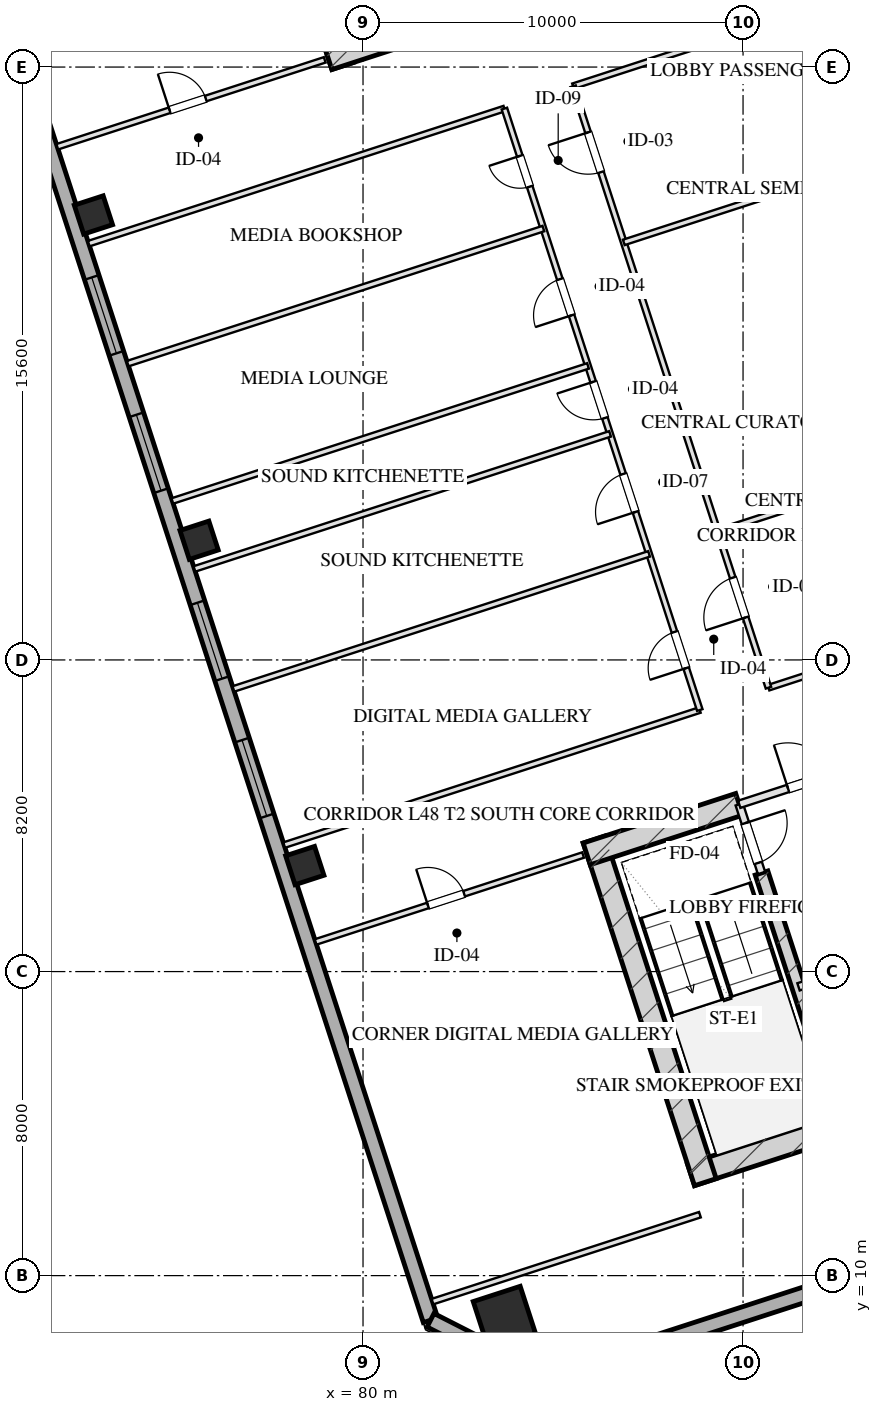
"""IFC4 building model, lengths in metres.
Left out: names, types, materials, properties, quantities, classifications, styles, units other than length and angle.
Written with IfcOpenShell. Run it as: python <this file> out.ifc"""

import sys

from ifc_helpers import new_model, si_unit, direction, frame, frame_2d, origin, origin_2d, place, context, subcontext, project, spatial, rectangle, hollow_rectangle, extrude, element, fill, save


model = new_model("IFC4")
c1 = context("Model", 3, precision=1e-05, world=origin(), true_north=direction((0.0, 1.0)))
c2 = subcontext(c1, "Body", "Model", "MODEL_VIEW")
j1 = project(units=[si_unit("LENGTHUNIT", "METRE"), si_unit("PLANEANGLEUNIT", "RADIAN")], contexts=[c1])
p1 = place(None, origin())
s1 = spatial("IfcSite", under=j1, at=p1, CompositionType="ELEMENT")
p2 = place(p1, origin())
s2 = spatial("IfcBuilding", under=s1, at=p2, CompositionType="ELEMENT")
p3 = place(p2, frame((0.0, 0.0, 180.55)))
s3 = spatial("IfcBuildingStorey", under=s2, at=p3, CompositionType="ELEMENT", Elevation=180.55)
p4 = place(p3, frame((88.63, 12.652, 0.0), z_axis=(0.0, 0.0, 1.0), x_axis=(0.95105714907, 0.309015046886, 0.0)))
e1 = element("IfcWall", 1, at=p4, inside=s3, PredefinedType="SHEAR", context=c2, shape_type="SweptSolid", body=[
    extrude(rectangle(XDim=16.4, YDim=0.6, at=frame_2d((8.2, 0.0))), origin(), (0.0, 0.0, 1.0), 3.45),
])
p5 = place(p3, frame((86.078, 21.475, 0.0), z_axis=(0.0, 0.0, 1.0), x_axis=(0.309017938678, -0.951056209472, 0.0)))
e2 = element("IfcWall", 2, at=p5, inside=s3, PredefinedType="SHEAR", context=c2, shape_type="SweptSolid", body=[
    extrude(rectangle(XDim=9.48, YDim=0.6, at=frame_2d((4.74, 0.0))), origin(), (0.0, 0.0, 1.0), 3.45),
])
p6 = place(p3, frame((90.486, 20.594, 0.0), z_axis=(0.0, 0.0, 1.0), x_axis=(0.309020428229, -0.951055400562, 0.0)))
e3 = element("IfcWall", 3, at=p6, inside=s3, PredefinedType="SHEAR", context=c2, shape_type="SweptSolid", body=[
    extrude(rectangle(XDim=6.98, YDim=0.35, at=frame_2d((3.49, 0.0))), origin(), (0.0, 0.0, 1.0), 3.45),
])
p7 = place(p3, frame((85.886, 21.097, 0.0), z_axis=(0.0, 0.0, 1.0), x_axis=(0.951068073652, 0.308981422225, 0.0)))
e4 = element("IfcWall", 4, at=p7, inside=s3, PredefinedType="SHEAR", context=c2, shape_type="SweptSolid", body=[
    extrude(rectangle(XDim=4.22, YDim=0.6, at=frame_2d((2.11, 0.0))), origin(), (0.0, 0.0, 1.0), 3.45),
])
p8 = place(p3, frame((79.466, 41.828, 0.0), z_axis=(0.0, 0.0, 1.0), x_axis=(-0.309041232772, 0.951048640421, 0.0)))
e5 = element("IfcWall", 5, at=p8, inside=s3, PredefinedType="SHEAR", context=c2, shape_type="SweptSolid", body=[
    extrude(rectangle(XDim=9.48, YDim=0.6, at=frame_2d((4.74, 0.0))), origin(), (0.0, 0.0, 1.0), 3.45),
])
p9 = place(p3, frame((79.087, 42.021, 0.0), z_axis=(0.0, 0.0, 1.0), x_axis=(0.951062550203, 0.3089984233, 0.0)))
e6 = element("IfcWall", 6, at=p9, inside=s3, PredefinedType="SHEAR", context=c2, shape_type="SweptSolid", body=[
    extrude(rectangle(XDim=4.22, YDim=0.6, at=frame_2d((2.11, 0.0))), origin(), (0.0, 0.0, 1.0), 3.45),
])
p10 = place(p3, frame((83.719, 8.901, 0.0), z_axis=(0.0, 0.0, 1.0), x_axis=(0.951056516295, 0.309016994375, 0.0)))
e7 = element("IfcColumn", 7, at=p10, inside=s3, PredefinedType="COLUMN", context=c2, shape_type="SweptSolid", body=[
    extrude(hollow_rectangle(XDim=1.3, YDim=1.3, WallThickness=0.045, at=origin_2d()), origin(), (0.0, 0.0, 1.0), 3.451),
])
for number, where, z_axis, x_axis in (
    (8, (78.468, 20.79, 0.0), (0.0, 0.0, 1.0), (0.951, 0.309, 0.0)),
    (9, (75.687, 29.349, 0.0), (0.0, 0.0, 1.0), (0.951, 0.309, 0.0)),
    (10, (72.906, 37.909, 0.0), (0.0, 0.0, 1.0), (0.951, 0.309, 0.0)),
):
    element("IfcColumn", number, at=place(p3, frame(where, z_axis=z_axis, x_axis=x_axis)), inside=s3, PredefinedType="COLUMN", context=c2, shape_type="SweptSolid", body=[
        extrude(hollow_rectangle(XDim=0.8, YDim=0.8, WallThickness=0.028, at=origin_2d()), origin(), (0.0, 0.0, 1.0), 3.451),
    ])
p11 = place(p3, frame((81.776, 8.827, 0.0), z_axis=(0.0, 0.0, 1.0), x_axis=(-0.309014228706, 0.951057414911, 0.0)))
e11 = element("IfcWall", 11, at=p11, inside=s3, PredefinedType="SOLIDWALL", context=c2, shape_type="SweptSolid", body=[
    extrude(rectangle(XDim=42.8, YDim=0.4, at=frame_2d((21.4, 0.0))), origin(), (0.0, 0.0, 1.0), 2.55),
])
p12 = place(p11, frame((13.95, 0.0, 0.75)))
e12 = element("IfcOpeningElement", 12, at=p12, cuts=e11, PredefinedType="OPENING", context=c2, shape_type="SweptSolid", body=[
    extrude(rectangle(XDim=2.1, YDim=1.4, at=frame_2d((1.05, 0.7))), frame((0.0, 0.21, 0.0), z_axis=(0.0, -1.0, 0.0), x_axis=(1.0, 0.0, 0.0)), (0.0, 0.0, 1.0), 0.42),
])
p13 = place(p11, frame((17.75, 0.0, 0.75)))
e13 = element("IfcOpeningElement", 13, at=p13, cuts=e11, PredefinedType="OPENING", context=c2, shape_type="SweptSolid", body=[
    extrude(rectangle(XDim=2.1, YDim=1.4, at=frame_2d((1.05, 0.7))), frame((0.0, 0.21, 0.0), z_axis=(0.0, -1.0, 0.0), x_axis=(1.0, 0.0, 0.0)), (0.0, 0.0, 1.0), 0.42),
])
p14 = place(p11, frame((22.95, 0.0, 0.75)))
e14 = element("IfcOpeningElement", 14, at=p14, cuts=e11, PredefinedType="OPENING", context=c2, shape_type="SweptSolid", body=[
    extrude(rectangle(XDim=2.1, YDim=1.4, at=frame_2d((1.05, 0.7))), frame((0.0, 0.21, 0.0), z_axis=(0.0, -1.0, 0.0), x_axis=(1.0, 0.0, 0.0)), (0.0, 0.0, 1.0), 0.42),
])
p15 = place(p11, frame((26.75, 0.0, 0.75)))
e15 = element("IfcOpeningElement", 15, at=p15, cuts=e11, PredefinedType="OPENING", context=c2, shape_type="SweptSolid", body=[
    extrude(rectangle(XDim=2.1, YDim=1.4, at=frame_2d((1.05, 0.7))), frame((0.0, 0.21, 0.0), z_axis=(0.0, -1.0, 0.0), x_axis=(1.0, 0.0, 0.0)), (0.0, 0.0, 1.0), 0.42),
])
p16 = place(p3, frame((109.908, 15.444, 0.0), z_axis=(0.0, 0.0, 1.0), x_axis=(-0.951057580055, -0.30901372044, 0.0)))
e16 = element("IfcWall", 16, at=p16, inside=s3, PredefinedType="SOLIDWALL", context=c2, shape_type="SweptSolid", body=[
    extrude(rectangle(XDim=26.4, YDim=0.4, at=frame_2d((13.2, 0.0))), origin(), (0.0, 0.0, 1.0), 2.55),
])
p17 = place(p3, frame((84.801, 7.286, 0.0), z_axis=(0.0, 0.0, 1.0), x_axis=(-0.891020832027, 0.453962417932, 0.0)))
e17 = element("IfcWall", 17, at=p17, inside=s3, PredefinedType="SOLIDWALL", context=c2, shape_type="SweptSolid", body=[
    extrude(rectangle(XDim=3.394, YDim=0.4, at=frame_2d((1.697, 0.0))), origin(), (0.0, 0.0, 1.0), 2.55),
])
p18 = place(p3, frame((89.899, 22.401, 0.0), z_axis=(0.0, 0.0, 1.0), x_axis=(0.308932062672, -0.951084108086, 0.0)))
e18 = element("IfcWall", 18, at=p18, inside=s3, PredefinedType="PARTITIONING", context=c2, shape_type="SweptSolid", body=[
    extrude(rectangle(XDim=1.9, YDim=0.2, at=frame_2d((0.95, 0.0))), origin(), (0.0, 0.0, 1.0), 3.155),
])
p19 = place(p18, frame((0.52, 0.0, 0.0)))
e19 = element("IfcOpeningElement", 19, at=p19, cuts=e18, PredefinedType="OPENING", context=c2, shape_type="SweptSolid", body=[
    extrude(rectangle(XDim=1.1, YDim=2.05, at=frame_2d((0.55, 1.025))), frame((0.0, 0.11, 0.0), z_axis=(0.0, -1.0, 0.0), x_axis=(1.0, 0.0, 0.0)), (0.0, 0.0, 1.0), 0.22),
])
p20 = place(p3, frame((89.899, 22.401, 0.0), z_axis=(0.0, 0.0, 1.0), x_axis=(0.951046716504, 0.309047153403, 0.0)))
e20 = element("IfcWall", 20, at=p20, inside=s3, PredefinedType="PARTITIONING", context=c2, shape_type="SweptSolid", body=[
    extrude(rectangle(XDim=3.83, YDim=0.2, at=frame_2d((1.915, 0.0))), origin(), (0.0, 0.0, 1.0), 3.155),
])
p21 = place(p20, frame((1.35, 0.0, 0.0)))
e21 = element("IfcOpeningElement", 21, at=p21, cuts=e20, PredefinedType="OPENING", context=c2, shape_type="SweptSolid", body=[
    extrude(rectangle(XDim=1.2, YDim=2.05, at=frame_2d((0.6, 1.025))), frame((0.0, 0.11, 0.0), z_axis=(0.0, -1.0, 0.0), x_axis=(1.0, 0.0, 0.0)), (0.0, 0.0, 1.0), 0.22),
])
p22 = place(p3, frame((91.46, 17.598, 0.0), z_axis=(0.0, 0.0, 1.0), x_axis=(0.951062257173, 0.308999325213, 0.0)))
e22 = element("IfcWall", 22, at=p22, inside=s3, PredefinedType="PARTITIONING", context=c2, shape_type="SweptSolid", body=[
    extrude(rectangle(XDim=2.1, YDim=0.2, at=frame_2d((1.05, 0.0))), origin(), (0.0, 0.0, 1.0), 3.155),
])
p23 = place(p22, frame((0.35, 0.0, 0.0)))
e23 = element("IfcOpeningElement", 23, at=p23, cuts=e22, PredefinedType="OPENING", context=c2, shape_type="SweptSolid", body=[
    extrude(rectangle(XDim=1.1, YDim=2.05, at=frame_2d((0.55, 1.025))), frame((0.0, 0.11, 0.0), z_axis=(0.0, -1.0, 0.0), x_axis=(1.0, 0.0, 0.0)), (0.0, 0.0, 1.0), 0.22),
])
p24 = place(p3, frame((81.828, 9.316, 0.0), z_axis=(0.0, 0.0, 1.0), x_axis=(0.95105128112, 0.309033106124, 0.0)))
e24 = element("IfcWall", 24, at=p24, inside=s3, PredefinedType="PARTITIONING", context=c2, shape_type="SweptSolid", body=[
    extrude(rectangle(XDim=7.4, YDim=0.15, at=frame_2d((3.7, 0.0))), origin(), (0.0, 0.0, 1.0), 3.155),
])
p25 = place(p3, frame((78.753, 18.78, 0.0), z_axis=(0.0, 0.0, 1.0), x_axis=(0.951060977215, 0.309003264738, 0.0)))
e25 = element("IfcWall", 25, at=p25, inside=s3, PredefinedType="PARTITIONING", context=c2, shape_type="SweptSolid", body=[
    extrude(rectangle(XDim=7.4, YDim=0.15, at=frame_2d((3.7, 0.0))), origin(), (0.0, 0.0, 1.0), 3.155),
])
p26 = place(p25, frame((3.108, 0.0, 0.0)))
e26 = element("IfcOpeningElement", 26, at=p26, cuts=e25, PredefinedType="OPENING", context=c2, shape_type="SweptSolid", body=[
    extrude(rectangle(XDim=1.0, YDim=2.05, at=frame_2d((0.5, 1.025))), frame((0.0, 0.085, 0.0), z_axis=(0.0, -1.0, 0.0), x_axis=(1.0, 0.0, 0.0)), (0.0, 0.0, 1.0), 0.17),
])
p27 = place(p3, frame((71.955, 39.703, 0.0), z_axis=(0.0, 0.0, 1.0), x_axis=(0.951060977215, 0.309003264738, 0.0)))
e27 = element("IfcWall", 27, at=p27, inside=s3, PredefinedType="PARTITIONING", context=c2, shape_type="SweptSolid", body=[
    extrude(rectangle(XDim=7.4, YDim=0.15, at=frame_2d((3.7, 0.0))), origin(), (0.0, 0.0, 1.0), 3.155),
])
p28 = place(p27, frame((3.108, 0.0, 0.0)))
e28 = element("IfcOpeningElement", 28, at=p28, cuts=e27, PredefinedType="OPENING", context=c2, shape_type="SweptSolid", body=[
    extrude(rectangle(XDim=1.0, YDim=2.05, at=frame_2d((0.5, 1.025))), frame((0.0, 0.085, 0.0), z_axis=(0.0, -1.0, 0.0), x_axis=(1.0, 0.0, 0.0)), (0.0, 0.0, 1.0), 0.17),
])
p29 = place(p3, frame((77.925, 21.328, 0.0), z_axis=(0.0, 0.0, 1.0), x_axis=(0.951054972381, 0.309021746015, 0.0)))
e29 = element("IfcWall", 29, at=p29, inside=s3, PredefinedType="PARTITIONING", context=c2, shape_type="SweptSolid", body=[
    extrude(rectangle(XDim=11.5, YDim=0.15, at=frame_2d((5.75, 0.0))), origin(), (0.0, 0.0, 1.0), 3.155),
])
p30 = place(p3, frame((90.669, 25.469, 0.0), z_axis=(0.0, 0.0, 1.0), x_axis=(0.95106136293, 0.309002077568, 0.0)))
e30 = element("IfcWall", 30, at=p30, inside=s3, PredefinedType="PARTITIONING", context=c2, shape_type="SweptSolid", body=[
    extrude(rectangle(XDim=8.15, YDim=0.15, at=frame_2d((4.075, 0.0))), origin(), (0.0, 0.0, 1.0), 3.155),
])
p31 = place(p3, frame((72.783, 37.154, 0.0), z_axis=(0.0, 0.0, 1.0), x_axis=(0.951056999652, 0.309015506751, 0.0)))
e31 = element("IfcWall", 31, at=p31, inside=s3, PredefinedType="PARTITIONING", context=c2, shape_type="SweptSolid", body=[
    extrude(rectangle(XDim=11.5, YDim=0.15, at=frame_2d((5.75, 0.0))), origin(), (0.0, 0.0, 1.0), 3.155),
])
p32 = place(p3, frame((85.527, 41.295, 0.0), z_axis=(0.0, 0.0, 1.0), x_axis=(0.951055419664, 0.309020369437, 0.0)))
e32 = element("IfcWall", 32, at=p32, inside=s3, PredefinedType="PARTITIONING", context=c2, shape_type="SweptSolid", body=[
    extrude(rectangle(XDim=8.15, YDim=0.15, at=frame_2d((4.075, 0.0))), origin(), (0.0, 0.0, 1.0), 3.155),
])
p33 = place(p3, frame((88.862, 24.882, 0.0), z_axis=(0.0, 0.0, 1.0), x_axis=(-0.309008771245, 0.951059188113, 0.0)))
e33 = element("IfcWall", 33, at=p33, inside=s3, PredefinedType="PARTITIONING", context=c2, shape_type="SweptSolid", body=[
    extrude(rectangle(XDim=16.64, YDim=0.15, at=frame_2d((8.32, 0.0))), origin(), (0.0, 0.0, 1.0), 3.155),
])
p34 = place(p33, frame((1.16, 0.0, 0.0)))
e34 = element("IfcOpeningElement", 34, at=p34, cuts=e33, PredefinedType="OPENING", context=c2, shape_type="SweptSolid", body=[
    extrude(rectangle(XDim=1.0, YDim=2.05, at=frame_2d((0.5, 1.025))), frame((0.0, 0.085, 0.0), z_axis=(0.0, -1.0, 0.0), x_axis=(1.0, 0.0, 0.0)), (0.0, 0.0, 1.0), 0.17),
])
p35 = place(p33, frame((5.48, 0.0, 0.0)))
e35 = element("IfcOpeningElement", 35, at=p35, cuts=e33, PredefinedType="OPENING", context=c2, shape_type="SweptSolid", body=[
    extrude(rectangle(XDim=1.05, YDim=2.05, at=frame_2d((0.525, 1.025))), frame((0.0, 0.085, 0.0), z_axis=(0.0, -1.0, 0.0), x_axis=(1.0, 0.0, 0.0)), (0.0, 0.0, 1.0), 0.17),
])
p36 = place(p33, frame((8.08, 0.0, 0.0)))
e36 = element("IfcOpeningElement", 36, at=p36, cuts=e33, PredefinedType="OPENING", context=c2, shape_type="SweptSolid", body=[
    extrude(rectangle(XDim=1.0, YDim=2.05, at=frame_2d((0.5, 1.025))), frame((0.0, 0.085, 0.0), z_axis=(0.0, -1.0, 0.0), x_axis=(1.0, 0.0, 0.0)), (0.0, 0.0, 1.0), 0.17),
])
p37 = place(p33, frame((10.92, 0.0, 0.0)))
e37 = element("IfcOpeningElement", 37, at=p37, cuts=e33, PredefinedType="OPENING", context=c2, shape_type="SweptSolid", body=[
    extrude(rectangle(XDim=1.0, YDim=2.05, at=frame_2d((0.5, 1.025))), frame((0.0, 0.085, 0.0), z_axis=(0.0, -1.0, 0.0), x_axis=(1.0, 0.0, 0.0)), (0.0, 0.0, 1.0), 0.17),
])
p38 = place(p33, frame((14.48, 0.0, 0.0)))
e38 = element("IfcOpeningElement", 38, at=p38, cuts=e33, PredefinedType="OPENING", context=c2, shape_type="SweptSolid", body=[
    extrude(rectangle(XDim=0.85, YDim=2.05, at=frame_2d((0.425, 1.025))), frame((0.0, 0.085, 0.0), z_axis=(0.0, -1.0, 0.0), x_axis=(1.0, 0.0, 0.0)), (0.0, 0.0, 1.0), 0.17),
])
p39 = place(p3, frame((90.669, 25.469, 0.0), z_axis=(0.0, 0.0, 1.0), x_axis=(-0.309022042254, 0.951054876125, 0.0)))
e39 = element("IfcWall", 39, at=p39, inside=s3, PredefinedType="PARTITIONING", context=c2, shape_type="SweptSolid", body=[
    extrude(rectangle(XDim=16.64, YDim=0.15, at=frame_2d((8.32, 0.0))), origin(), (0.0, 0.0, 1.0), 3.155),
])
p40 = place(p39, frame((1.944, 0.0, 0.0)))
e40 = element("IfcOpeningElement", 40, at=p40, cuts=e39, PredefinedType="OPENING", context=c2, shape_type="SweptSolid", body=[
    extrude(rectangle(XDim=1.1, YDim=2.05, at=frame_2d((0.55, 1.025))), frame((0.0, 0.085, 0.0), z_axis=(0.0, -1.0, 0.0), x_axis=(1.0, 0.0, 0.0)), (0.0, 0.0, 1.0), 0.17),
])
p41 = place(p39, frame((14.264, 0.0, 0.0)))
e41 = element("IfcOpeningElement", 41, at=p41, cuts=e39, PredefinedType="OPENING", context=c2, shape_type="SweptSolid", body=[
    extrude(rectangle(XDim=1.1, YDim=2.05, at=frame_2d((0.55, 1.025))), frame((0.0, 0.085, 0.0), z_axis=(0.0, -1.0, 0.0), x_axis=(1.0, 0.0, 0.0)), (0.0, 0.0, 1.0), 0.17),
])
p42 = place(p3, frame((89.334, 29.578, 0.0), z_axis=(0.0, 0.0, 1.0), x_axis=(0.951052558989, 0.309029173445, 0.0)))
e42 = element("IfcWall", 42, at=p42, inside=s3, PredefinedType="PARTITIONING", context=c2, shape_type="SweptSolid", body=[
    extrude(rectangle(XDim=8.15, YDim=0.15, at=frame_2d((4.075, 0.0))), origin(), (0.0, 0.0, 1.0), 3.155),
])
p43 = place(p3, frame((86.862, 37.186, 0.0), z_axis=(0.0, 0.0, 1.0), x_axis=(0.95106422313, 0.308993274169, 0.0)))
e43 = element("IfcWall", 43, at=p43, inside=s3, PredefinedType="PARTITIONING", context=c2, shape_type="SweptSolid", body=[
    extrude(rectangle(XDim=8.15, YDim=0.15, at=frame_2d((4.075, 0.0))), origin(), (0.0, 0.0, 1.0), 3.155),
])
for number, where, z_axis, x_axis in (
    (44, (76.59, 25.437, 0.0), (0.0, 0.0, 1.0), (0.951, 0.309, 0.0)),
    (45, (75.564, 28.594, 0.0), (0.0, 0.0, 1.0), (0.951, 0.309, 0.0)),
):
    element("IfcWall", number, at=place(p3, frame(where, z_axis=z_axis, x_axis=x_axis)), inside=s3, PredefinedType="PARTITIONING", context=c2, shape_type="SweptSolid", body=[
        extrude(rectangle(XDim=11.5, YDim=0.15, at=frame_2d((5.75, 0.0))), origin(), (0.0, 0.0, 1.0), 3.155),
    ])
for number, where, z_axis, x_axis in (
    (46, (74.983, 30.382, 0.0), (0.0, 0.0, 1.0), (0.951, 0.309, 0.0)),
    (47, (73.809, 33.996, 0.0), (0.0, 0.0, 1.0), (0.951, 0.309, 0.0)),
):
    element("IfcWall", number, at=place(p3, frame(where, z_axis=z_axis, x_axis=x_axis)), inside=s3, PredefinedType="PARTITIONING", context=c2, shape_type="SweptSolid", body=[
        extrude(rectangle(XDim=11.5, YDim=0.15, at=frame_2d((5.75, 0.0))), origin(), (0.0, 0.0, 1.0), 3.155),
    ])
p44 = place(p12, origin())
e48 = element("IfcWindow", 48, at=p44, inside=s3, PartitioningType="TRIPLE_PANEL_VERTICAL", PredefinedType="WINDOW", context=c2, shape_type="SweptSolid", body=[
    extrude(rectangle(XDim=2.1, YDim=1.4, at=frame_2d((1.05, 0.7))), frame((0.0, 0.03, 0.0), z_axis=(0.0, -1.0, 0.0), x_axis=(1.0, 0.0, 0.0)), (0.0, 0.0, 1.0), 0.06),
])
fill(e12, e48)
p45 = place(p13, origin())
e49 = element("IfcWindow", 49, at=p45, inside=s3, PartitioningType="TRIPLE_PANEL_VERTICAL", PredefinedType="WINDOW", context=c2, shape_type="SweptSolid", body=[
    extrude(rectangle(XDim=2.1, YDim=1.4, at=frame_2d((1.05, 0.7))), frame((0.0, 0.03, 0.0), z_axis=(0.0, -1.0, 0.0), x_axis=(1.0, 0.0, 0.0)), (0.0, 0.0, 1.0), 0.06),
])
fill(e13, e49)
p46 = place(p14, origin())
e50 = element("IfcWindow", 50, at=p46, inside=s3, PartitioningType="TRIPLE_PANEL_VERTICAL", PredefinedType="WINDOW", context=c2, shape_type="SweptSolid", body=[
    extrude(rectangle(XDim=2.1, YDim=1.4, at=frame_2d((1.05, 0.7))), frame((0.0, 0.03, 0.0), z_axis=(0.0, -1.0, 0.0), x_axis=(1.0, 0.0, 0.0)), (0.0, 0.0, 1.0), 0.06),
])
fill(e14, e50)
p47 = place(p15, origin())
e51 = element("IfcWindow", 51, at=p47, inside=s3, PartitioningType="TRIPLE_PANEL_VERTICAL", PredefinedType="WINDOW", context=c2, shape_type="SweptSolid", body=[
    extrude(rectangle(XDim=2.1, YDim=1.4, at=frame_2d((1.05, 0.7))), frame((0.0, 0.03, 0.0), z_axis=(0.0, -1.0, 0.0), x_axis=(1.0, 0.0, 0.0)), (0.0, 0.0, 1.0), 0.06),
])
fill(e15, e51)
p48 = place(p19, origin())
e52 = element("IfcDoor", 52, at=p48, inside=s3, OperationType="SINGLE_SWING_LEFT", PredefinedType="DOOR", context=c2, shape_type="SweptSolid", body=[
    extrude(rectangle(XDim=1.1, YDim=2.05, at=frame_2d((0.55, 1.025))), frame((0.0, 0.025, 0.0), z_axis=(0.0, -1.0, 0.0), x_axis=(1.0, 0.0, 0.0)), (0.0, 0.0, 1.0), 0.05),
])
fill(e19, e52)
p49 = place(p21, origin())
e53 = element("IfcDoor", 53, at=p49, inside=s3, OperationType="SINGLE_SWING_LEFT", PredefinedType="DOOR", context=c2, shape_type="SweptSolid", body=[
    extrude(rectangle(XDim=1.2, YDim=2.05, at=frame_2d((0.6, 1.025))), frame((0.0, 0.025, 0.0), z_axis=(0.0, -1.0, 0.0), x_axis=(1.0, 0.0, 0.0)), (0.0, 0.0, 1.0), 0.05),
])
fill(e21, e53)
p50 = place(p26, origin())
e54 = element("IfcDoor", 54, at=p50, inside=s3, OperationType="SINGLE_SWING_LEFT", PredefinedType="DOOR", context=c2, shape_type="SweptSolid", body=[
    extrude(rectangle(XDim=1.0, YDim=2.05, at=frame_2d((0.5, 1.025))), frame((0.0, 0.025, 0.0), z_axis=(0.0, -1.0, 0.0), x_axis=(1.0, 0.0, 0.0)), (0.0, 0.0, 1.0), 0.05),
])
fill(e26, e54)
p51 = place(p28, origin())
e55 = element("IfcDoor", 55, at=p51, inside=s3, OperationType="SINGLE_SWING_LEFT", PredefinedType="DOOR", context=c2, shape_type="SweptSolid", body=[
    extrude(rectangle(XDim=1.0, YDim=2.05, at=frame_2d((0.5, 1.025))), frame((0.0, 0.025, 0.0), z_axis=(0.0, -1.0, 0.0), x_axis=(1.0, 0.0, 0.0)), (0.0, 0.0, 1.0), 0.05),
])
fill(e28, e55)
p52 = place(p34, origin())
e56 = element("IfcDoor", 56, at=p52, inside=s3, OperationType="SINGLE_SWING_LEFT", PredefinedType="DOOR", context=c2, shape_type="SweptSolid", body=[
    extrude(rectangle(XDim=1.0, YDim=2.05, at=frame_2d((0.5, 1.025))), frame((0.0, 0.025, 0.0), z_axis=(0.0, -1.0, 0.0), x_axis=(1.0, 0.0, 0.0)), (0.0, 0.0, 1.0), 0.05),
])
fill(e34, e56)
p53 = place(p35, origin())
e57 = element("IfcDoor", 57, at=p53, inside=s3, OperationType="SINGLE_SWING_LEFT", PredefinedType="DOOR", context=c2, shape_type="SweptSolid", body=[
    extrude(rectangle(XDim=1.05, YDim=2.05, at=frame_2d((0.525, 1.025))), frame((0.0, 0.025, 0.0), z_axis=(0.0, -1.0, 0.0), x_axis=(1.0, 0.0, 0.0)), (0.0, 0.0, 1.0), 0.05),
])
fill(e35, e57)
p54 = place(p36, origin())
e58 = element("IfcDoor", 58, at=p54, inside=s3, OperationType="SINGLE_SWING_RIGHT", PredefinedType="DOOR", context=c2, shape_type="SweptSolid", body=[
    extrude(rectangle(XDim=1.0, YDim=2.05, at=frame_2d((0.5, 1.025))), frame((0.0, 0.025, 0.0), z_axis=(0.0, -1.0, 0.0), x_axis=(1.0, 0.0, 0.0)), (0.0, 0.0, 1.0), 0.05),
])
fill(e36, e58)
p55 = place(p37, origin())
e59 = element("IfcDoor", 59, at=p55, inside=s3, OperationType="SINGLE_SWING_LEFT", PredefinedType="DOOR", context=c2, shape_type="SweptSolid", body=[
    extrude(rectangle(XDim=1.0, YDim=2.05, at=frame_2d((0.5, 1.025))), frame((0.0, 0.025, 0.0), z_axis=(0.0, -1.0, 0.0), x_axis=(1.0, 0.0, 0.0)), (0.0, 0.0, 1.0), 0.05),
])
fill(e37, e59)
p56 = place(p38, origin())
e60 = element("IfcDoor", 60, at=p56, inside=s3, OperationType="SINGLE_SWING_RIGHT", PredefinedType="DOOR", context=c2, shape_type="SweptSolid", body=[
    extrude(rectangle(XDim=0.85, YDim=2.05, at=frame_2d((0.425, 1.025))), frame((0.0, 0.025, 0.0), z_axis=(0.0, -1.0, 0.0), x_axis=(1.0, 0.0, 0.0)), (0.0, 0.0, 1.0), 0.05),
])
fill(e38, e60)
p57 = place(p40, origin())
e61 = element("IfcDoor", 61, at=p57, inside=s3, OperationType="SINGLE_SWING_LEFT", PredefinedType="DOOR", context=c2, shape_type="SweptSolid", body=[
    extrude(rectangle(XDim=1.1, YDim=2.05, at=frame_2d((0.55, 1.025))), frame((0.0, 0.025, 0.0), z_axis=(0.0, -1.0, 0.0), x_axis=(1.0, 0.0, 0.0)), (0.0, 0.0, 1.0), 0.05),
])
fill(e40, e61)
p58 = place(p41, origin())
e62 = element("IfcDoor", 62, at=p58, inside=s3, OperationType="SINGLE_SWING_RIGHT", PredefinedType="DOOR", context=c2, shape_type="SweptSolid", body=[
    extrude(rectangle(XDim=1.1, YDim=2.05, at=frame_2d((0.55, 1.025))), frame((0.0, 0.025, 0.0), z_axis=(0.0, -1.0, 0.0), x_axis=(1.0, 0.0, 0.0)), (0.0, 0.0, 1.0), 0.05),
])
fill(e41, e62)
save(model, sys.argv[1])
